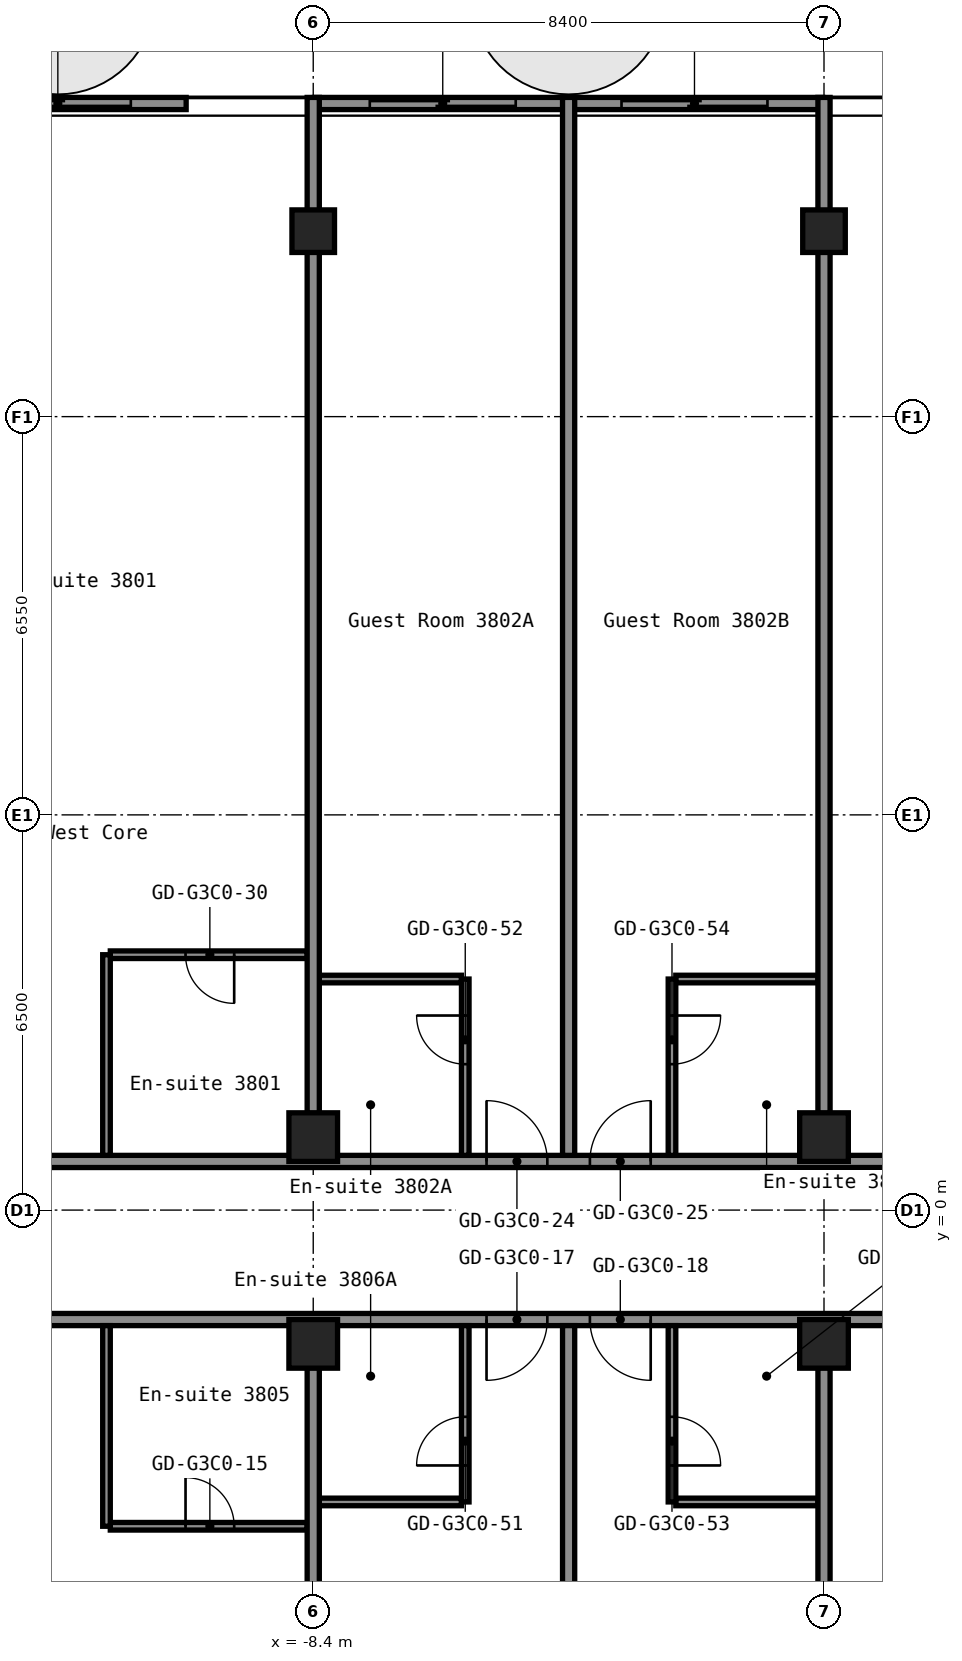
"""IFC4 building model, lengths in metres.
Left out: names, types, materials, properties, quantities, classifications, styles, units other than length and angle.
Written with IfcOpenShell. Run it as: python <this file> out.ifc"""

import sys

from ifc_helpers import new_model, si_unit, direction, frame, frame_2d, origin, origin_2d, place, context, subcontext, project, spatial, rectangle, hollow_rectangle, extrude, element, fill, save


model = new_model("IFC4")
c1 = context("Model", 3, precision=1e-05, world=origin(), true_north=direction((0.0, 1.0)))
c2 = subcontext(c1, "Body", "Model", "MODEL_VIEW")
j1 = project(units=[si_unit("LENGTHUNIT", "METRE"), si_unit("PLANEANGLEUNIT", "RADIAN")], contexts=[c1])
p1 = place(None, origin())
s1 = spatial("IfcSite", under=j1, at=p1, CompositionType="ELEMENT")
p2 = place(p1, origin())
s2 = spatial("IfcBuilding", under=s1, at=p2, CompositionType="ELEMENT")
p3 = place(p2, frame((0.0, 0.0, 137.4)))
s3 = spatial("IfcBuildingStorey", under=s2, at=p3, CompositionType="ELEMENT", Elevation=137.4)
for number, where, z_axis, x_axis in (
    (1, (-8.4, -2.2, 0.0), (0.0, 0.0, 1.0), (1.0, 0.0, 0.0)),
    (2, (-8.4, 1.2, 0.0), (0.0, 0.0, 1.0), (1.0, 0.0, 0.0)),
):
    element("IfcColumn", number, at=place(p3, frame(where, z_axis=z_axis, x_axis=x_axis)), inside=s3, PredefinedType="COLUMN", context=c2, shape_type="SweptSolid", body=[
        extrude(hollow_rectangle(XDim=0.8, YDim=0.8, WallThickness=0.032, at=origin_2d()), origin(), (0.0, 0.0, 1.0), 2.75),
    ])
p4 = place(p3, frame((-8.4, 16.1, 0.0), z_axis=(0.0, 0.0, 1.0), x_axis=(1.0, 0.0, 0.0)))
e3 = element("IfcColumn", 3, at=p4, inside=s3, PredefinedType="COLUMN", context=c2, shape_type="SweptSolid", body=[
    extrude(hollow_rectangle(XDim=0.7, YDim=0.7, WallThickness=0.028, at=origin_2d()), origin(), (0.0, 0.0, 1.0), 2.75),
])
for number, where, z_axis, x_axis in (
    (4, (0.0, -2.2, 0.0), (0.0, 0.0, 1.0), (1.0, 0.0, 0.0)),
    (5, (0.0, 1.2, 0.0), (0.0, 0.0, 1.0), (1.0, 0.0, 0.0)),
):
    element("IfcColumn", number, at=place(p3, frame(where, z_axis=z_axis, x_axis=x_axis)), inside=s3, PredefinedType="COLUMN", context=c2, shape_type="SweptSolid", body=[
        extrude(hollow_rectangle(XDim=0.8, YDim=0.8, WallThickness=0.032, at=origin_2d()), origin(), (0.0, 0.0, 1.0), 2.75),
    ])
p5 = place(p3, frame((0.0, 16.1, 0.0), z_axis=(0.0, 0.0, 1.0), x_axis=(1.0, 0.0, 0.0)))
e6 = element("IfcColumn", 6, at=p5, inside=s3, PredefinedType="COLUMN", context=c2, shape_type="SweptSolid", body=[
    extrude(hollow_rectangle(XDim=0.7, YDim=0.7, WallThickness=0.028, at=origin_2d()), origin(), (0.0, 0.0, 1.0), 2.75),
])
p6 = place(p3, frame((-11.738, -5.2, 0.0), z_axis=(0.0, 0.0, 1.0), x_axis=(1.0, 0.0, 0.0)))
e7 = element("IfcWall", 7, at=p6, inside=s3, PredefinedType="PARTITIONING", context=c2, shape_type="SweptSolid", body=[
    extrude(rectangle(XDim=3.238, YDim=0.125, at=frame_2d((1.619, 0.0))), origin(), (0.0, 0.0, 1.0), 2.75),
])
p7 = place(p6, frame((1.238, 0.0, 0.0)))
e8 = element("IfcOpeningElement", 8, at=p7, cuts=e7, PredefinedType="OPENING", context=c2, shape_type="SweptSolid", body=[
    extrude(rectangle(XDim=0.8, YDim=2.1, at=frame_2d((0.4, 1.05))), frame((0.0, 0.073, 0.0), z_axis=(0.0, -1.0, 0.0), x_axis=(1.0, 0.0, 0.0)), (0.0, 0.0, 1.0), 0.145),
])
p8 = place(p3, frame((-8.3, -4.8, 0.0), z_axis=(0.0, 0.0, 1.0), x_axis=(1.0, 0.0, 0.0)))
e9 = element("IfcWall", 9, at=p8, inside=s3, PredefinedType="PARTITIONING", context=c2, shape_type="SweptSolid", body=[
    extrude(rectangle(XDim=2.338, YDim=0.125, at=frame_2d((1.169, 0.0))), origin(), (0.0, 0.0, 1.0), 2.75),
])
p9 = place(p3, frame((-2.438, -4.8, 0.0), z_axis=(0.0, 0.0, 1.0), x_axis=(1.0, 0.0, 0.0)))
e10 = element("IfcWall", 10, at=p9, inside=s3, PredefinedType="PARTITIONING", context=c2, shape_type="SweptSolid", body=[
    extrude(rectangle(XDim=2.337, YDim=0.125, at=frame_2d((1.169, 0.0))), origin(), (0.0, 0.0, 1.0), 2.75),
])
p10 = place(p3, frame((-16.8, -1.8, 0.0), z_axis=(0.0, 0.0, 1.0), x_axis=(1.0, 0.0, 0.0)))
e11 = element("IfcWall", 11, at=p10, inside=s3, PredefinedType="PARTITIONING", context=c2, shape_type="SweptSolid", body=[
    extrude(rectangle(XDim=33.6, YDim=0.2, at=frame_2d((16.8, 0.0))), origin(), (0.0, 0.0, 1.0), 2.75),
])
p11 = place(p10, frame((2.0, 0.0, 0.0)))
e12 = element("IfcOpeningElement", 12, at=p11, cuts=e11, PredefinedType="OPENING", context=c2, shape_type="SweptSolid", body=[
    extrude(rectangle(XDim=1.0, YDim=2.1, at=frame_2d((0.5, 1.05))), frame((0.0, 0.11, 0.0), z_axis=(0.0, -1.0, 0.0), x_axis=(1.0, 0.0, 0.0)), (0.0, 0.0, 1.0), 0.22),
])
p12 = place(p10, frame((11.25, 0.0, 0.0)))
e13 = element("IfcOpeningElement", 13, at=p12, cuts=e11, PredefinedType="OPENING", context=c2, shape_type="SweptSolid", body=[
    extrude(rectangle(XDim=1.0, YDim=2.1, at=frame_2d((0.5, 1.05))), frame((0.0, 0.11, 0.0), z_axis=(0.0, -1.0, 0.0), x_axis=(1.0, 0.0, 0.0)), (0.0, 0.0, 1.0), 0.22),
])
p13 = place(p10, frame((12.95, 0.0, 0.0)))
e14 = element("IfcOpeningElement", 14, at=p13, cuts=e11, PredefinedType="OPENING", context=c2, shape_type="SweptSolid", body=[
    extrude(rectangle(XDim=1.0, YDim=2.1, at=frame_2d((0.5, 1.05))), frame((0.0, 0.11, 0.0), z_axis=(0.0, -1.0, 0.0), x_axis=(1.0, 0.0, 0.0)), (0.0, 0.0, 1.0), 0.22),
])
p14 = place(p10, frame((17.86, 0.0, 0.0)))
e15 = element("IfcOpeningElement", 15, at=p14, cuts=e11, PredefinedType="OPENING", context=c2, shape_type="SweptSolid", body=[
    extrude(rectangle(XDim=0.9, YDim=2.1, at=frame_2d((0.45, 1.05))), frame((0.0, 0.11, 0.0), z_axis=(0.0, -1.0, 0.0), x_axis=(1.0, 0.0, 0.0)), (0.0, 0.0, 1.0), 0.22),
])
p15 = place(p10, frame((22.06, 0.0, 0.0)))
e16 = element("IfcOpeningElement", 16, at=p15, cuts=e11, PredefinedType="OPENING", context=c2, shape_type="SweptSolid", body=[
    extrude(rectangle(XDim=0.9, YDim=2.1, at=frame_2d((0.45, 1.05))), frame((0.0, 0.11, 0.0), z_axis=(0.0, -1.0, 0.0), x_axis=(1.0, 0.0, 0.0)), (0.0, 0.0, 1.0), 0.22),
])
p16 = place(p10, frame((28.05, 0.0, 0.0)))
e17 = element("IfcOpeningElement", 17, at=p16, cuts=e11, PredefinedType="OPENING", context=c2, shape_type="SweptSolid", body=[
    extrude(rectangle(XDim=1.0, YDim=2.1, at=frame_2d((0.5, 1.05))), frame((0.0, 0.11, 0.0), z_axis=(0.0, -1.0, 0.0), x_axis=(1.0, 0.0, 0.0)), (0.0, 0.0, 1.0), 0.22),
])
p17 = place(p10, frame((29.75, 0.0, 0.0)))
e18 = element("IfcOpeningElement", 18, at=p17, cuts=e11, PredefinedType="OPENING", context=c2, shape_type="SweptSolid", body=[
    extrude(rectangle(XDim=1.0, YDim=2.1, at=frame_2d((0.5, 1.05))), frame((0.0, 0.11, 0.0), z_axis=(0.0, -1.0, 0.0), x_axis=(1.0, 0.0, 0.0)), (0.0, 0.0, 1.0), 0.22),
])
p18 = place(p3, frame((-16.8, 0.8, 0.0), z_axis=(0.0, 0.0, 1.0), x_axis=(1.0, 0.0, 0.0)))
e19 = element("IfcWall", 19, at=p18, inside=s3, PredefinedType="PARTITIONING", context=c2, shape_type="SweptSolid", body=[
    extrude(rectangle(XDim=33.6, YDim=0.2, at=frame_2d((16.8, 0.0))), origin(), (0.0, 0.0, 1.0), 2.75),
])
p19 = place(p18, frame((2.0, 0.0, 0.0)))
e20 = element("IfcOpeningElement", 20, at=p19, cuts=e19, PredefinedType="OPENING", context=c2, shape_type="SweptSolid", body=[
    extrude(rectangle(XDim=1.0, YDim=2.1, at=frame_2d((0.5, 1.05))), frame((0.0, 0.11, 0.0), z_axis=(0.0, -1.0, 0.0), x_axis=(1.0, 0.0, 0.0)), (0.0, 0.0, 1.0), 0.22),
])
p20 = place(p18, frame((11.25, 0.0, 0.0)))
e21 = element("IfcOpeningElement", 21, at=p20, cuts=e19, PredefinedType="OPENING", context=c2, shape_type="SweptSolid", body=[
    extrude(rectangle(XDim=1.0, YDim=2.1, at=frame_2d((0.5, 1.05))), frame((0.0, 0.11, 0.0), z_axis=(0.0, -1.0, 0.0), x_axis=(1.0, 0.0, 0.0)), (0.0, 0.0, 1.0), 0.22),
])
p21 = place(p18, frame((12.95, 0.0, 0.0)))
e22 = element("IfcOpeningElement", 22, at=p21, cuts=e19, PredefinedType="OPENING", context=c2, shape_type="SweptSolid", body=[
    extrude(rectangle(XDim=1.0, YDim=2.1, at=frame_2d((0.5, 1.05))), frame((0.0, 0.11, 0.0), z_axis=(0.0, -1.0, 0.0), x_axis=(1.0, 0.0, 0.0)), (0.0, 0.0, 1.0), 0.22),
])
p22 = place(p18, frame((18.7, 0.0, 0.0)))
e23 = element("IfcOpeningElement", 23, at=p22, cuts=e19, PredefinedType="OPENING", context=c2, shape_type="SweptSolid", body=[
    extrude(rectangle(XDim=0.9, YDim=2.1, at=frame_2d((0.45, 1.05))), frame((0.0, 0.11, 0.0), z_axis=(0.0, -1.0, 0.0), x_axis=(1.0, 0.0, 0.0)), (0.0, 0.0, 1.0), 0.22),
])
p23 = place(p18, frame((22.9, 0.0, 0.0)))
e24 = element("IfcOpeningElement", 24, at=p23, cuts=e19, PredefinedType="OPENING", context=c2, shape_type="SweptSolid", body=[
    extrude(rectangle(XDim=0.9, YDim=2.1, at=frame_2d((0.45, 1.05))), frame((0.0, 0.11, 0.0), z_axis=(0.0, -1.0, 0.0), x_axis=(1.0, 0.0, 0.0)), (0.0, 0.0, 1.0), 0.22),
])
p24 = place(p18, frame((28.05, 0.0, 0.0)))
e25 = element("IfcOpeningElement", 25, at=p24, cuts=e19, PredefinedType="OPENING", context=c2, shape_type="SweptSolid", body=[
    extrude(rectangle(XDim=1.0, YDim=2.1, at=frame_2d((0.5, 1.05))), frame((0.0, 0.11, 0.0), z_axis=(0.0, -1.0, 0.0), x_axis=(1.0, 0.0, 0.0)), (0.0, 0.0, 1.0), 0.22),
])
p25 = place(p18, frame((29.75, 0.0, 0.0)))
e26 = element("IfcOpeningElement", 26, at=p25, cuts=e19, PredefinedType="OPENING", context=c2, shape_type="SweptSolid", body=[
    extrude(rectangle(XDim=1.0, YDim=2.1, at=frame_2d((0.5, 1.05))), frame((0.0, 0.11, 0.0), z_axis=(0.0, -1.0, 0.0), x_axis=(1.0, 0.0, 0.0)), (0.0, 0.0, 1.0), 0.22),
])
p26 = place(p3, frame((-8.3, 3.8, 0.0), z_axis=(0.0, 0.0, 1.0), x_axis=(1.0, 0.0, 0.0)))
e27 = element("IfcWall", 27, at=p26, inside=s3, PredefinedType="PARTITIONING", context=c2, shape_type="SweptSolid", body=[
    extrude(rectangle(XDim=2.338, YDim=0.125, at=frame_2d((1.169, 0.0))), origin(), (0.0, 0.0, 1.0), 2.75),
])
p27 = place(p3, frame((-2.438, 3.8, 0.0), z_axis=(0.0, 0.0, 1.0), x_axis=(1.0, 0.0, 0.0)))
e28 = element("IfcWall", 28, at=p27, inside=s3, PredefinedType="PARTITIONING", context=c2, shape_type="SweptSolid", body=[
    extrude(rectangle(XDim=2.337, YDim=0.125, at=frame_2d((1.169, 0.0))), origin(), (0.0, 0.0, 1.0), 2.75),
])
p28 = place(p3, frame((-11.738, 4.2, 0.0), z_axis=(0.0, 0.0, 1.0), x_axis=(1.0, 0.0, 0.0)))
e29 = element("IfcWall", 29, at=p28, inside=s3, PredefinedType="PARTITIONING", context=c2, shape_type="SweptSolid", body=[
    extrude(rectangle(XDim=3.238, YDim=0.125, at=frame_2d((1.619, 0.0))), origin(), (0.0, 0.0, 1.0), 2.75),
])
p29 = place(p28, frame((1.238, 0.0, 0.0)))
e30 = element("IfcOpeningElement", 30, at=p29, cuts=e29, PredefinedType="OPENING", context=c2, shape_type="SweptSolid", body=[
    extrude(rectangle(XDim=0.8, YDim=2.1, at=frame_2d((0.4, 1.05))), frame((0.0, 0.073, 0.0), z_axis=(0.0, -1.0, 0.0), x_axis=(1.0, 0.0, 0.0)), (0.0, 0.0, 1.0), 0.145),
])
for number, where, z_axis, x_axis in (
    (31, (-11.8, -5.2, 0.0), (0.0, 0.0, 1.0), (0.0, 1.0, 0.0)),
    (32, (-11.8, 0.9, 0.0), (0.0, 0.0, 1.0), (0.0, 1.0, 0.0)),
):
    element("IfcWall", number, at=place(p3, frame(where, z_axis=z_axis, x_axis=x_axis)), inside=s3, PredefinedType="PARTITIONING", context=c2, shape_type="SweptSolid", body=[
        extrude(rectangle(XDim=3.3, YDim=0.125, at=frame_2d((1.65, 0.0))), origin(), (0.0, 0.0, 1.0), 2.75),
    ])
for number, where, z_axis, x_axis in (
    (33, (-8.4, -19.3, 0.0), (0.0, 0.0, 1.0), (0.0, 1.0, 0.0)),
    (34, (-8.4, 1.59, 0.0), (0.0, 0.0, 1.0), (0.0, 1.0, 0.0)),
):
    element("IfcWall", number, at=place(p3, frame(where, z_axis=z_axis, x_axis=x_axis)), inside=s3, PredefinedType="PARTITIONING", context=c2, shape_type="SweptSolid", body=[
        extrude(rectangle(XDim=16.71, YDim=0.2, at=frame_2d((8.355, 0.0))), origin(), (0.0, 0.0, 1.0), 2.75),
    ])
p30 = place(p3, frame((-5.9, -4.8, 0.0), z_axis=(0.0, 0.0, 1.0), x_axis=(0.0, 1.0, 0.0)))
e35 = element("IfcWall", 35, at=p30, inside=s3, PredefinedType="PARTITIONING", context=c2, shape_type="SweptSolid", body=[
    extrude(rectangle(XDim=2.9, YDim=0.125, at=frame_2d((1.45, 0.0))), origin(), (0.0, 0.0, 1.0), 2.75),
])
p31 = place(p30, frame((0.6, 0.0, 0.0)))
e36 = element("IfcOpeningElement", 36, at=p31, cuts=e35, PredefinedType="OPENING", context=c2, shape_type="SweptSolid", body=[
    extrude(rectangle(XDim=0.8, YDim=2.1, at=frame_2d((0.4, 1.05))), frame((0.0, 0.073, 0.0), z_axis=(0.0, -1.0, 0.0), x_axis=(1.0, 0.0, 0.0)), (0.0, 0.0, 1.0), 0.145),
])
p32 = place(p3, frame((-5.9, 0.9, 0.0), z_axis=(0.0, 0.0, 1.0), x_axis=(0.0, 1.0, 0.0)))
e37 = element("IfcWall", 37, at=p32, inside=s3, PredefinedType="PARTITIONING", context=c2, shape_type="SweptSolid", body=[
    extrude(rectangle(XDim=2.9, YDim=0.125, at=frame_2d((1.45, 0.0))), origin(), (0.0, 0.0, 1.0), 2.75),
])
p33 = place(p32, frame((1.5, 0.0, 0.0)))
e38 = element("IfcOpeningElement", 38, at=p33, cuts=e37, PredefinedType="OPENING", context=c2, shape_type="SweptSolid", body=[
    extrude(rectangle(XDim=0.8, YDim=2.1, at=frame_2d((0.4, 1.05))), frame((0.0, 0.073, 0.0), z_axis=(0.0, -1.0, 0.0), x_axis=(1.0, 0.0, 0.0)), (0.0, 0.0, 1.0), 0.145),
])
for number, where, z_axis, x_axis in (
    (39, (-4.2, -19.3, 0.0), (0.0, 0.0, 1.0), (0.0, 1.0, 0.0)),
    (40, (-4.2, 0.9, 0.0), (0.0, 0.0, 1.0), (0.0, 1.0, 0.0)),
):
    element("IfcWall", number, at=place(p3, frame(where, z_axis=z_axis, x_axis=x_axis)), inside=s3, PredefinedType="PARTITIONING", context=c2, shape_type="SweptSolid", body=[
        extrude(rectangle(XDim=17.4, YDim=0.2, at=frame_2d((8.7, 0.0))), origin(), (0.0, 0.0, 1.0), 2.75),
    ])
p34 = place(p3, frame((-2.5, -4.8, 0.0), z_axis=(0.0, 0.0, 1.0), x_axis=(0.0, 1.0, 0.0)))
e41 = element("IfcWall", 41, at=p34, inside=s3, PredefinedType="PARTITIONING", context=c2, shape_type="SweptSolid", body=[
    extrude(rectangle(XDim=2.9, YDim=0.125, at=frame_2d((1.45, 0.0))), origin(), (0.0, 0.0, 1.0), 2.75),
])
p35 = place(p34, frame((0.6, 0.0, 0.0)))
e42 = element("IfcOpeningElement", 42, at=p35, cuts=e41, PredefinedType="OPENING", context=c2, shape_type="SweptSolid", body=[
    extrude(rectangle(XDim=0.8, YDim=2.1, at=frame_2d((0.4, 1.05))), frame((0.0, 0.073, 0.0), z_axis=(0.0, -1.0, 0.0), x_axis=(1.0, 0.0, 0.0)), (0.0, 0.0, 1.0), 0.145),
])
p36 = place(p3, frame((-2.5, 0.9, 0.0), z_axis=(0.0, 0.0, 1.0), x_axis=(0.0, 1.0, 0.0)))
e43 = element("IfcWall", 43, at=p36, inside=s3, PredefinedType="PARTITIONING", context=c2, shape_type="SweptSolid", body=[
    extrude(rectangle(XDim=2.9, YDim=0.125, at=frame_2d((1.45, 0.0))), origin(), (0.0, 0.0, 1.0), 2.75),
])
p37 = place(p36, frame((1.5, 0.0, 0.0)))
e44 = element("IfcOpeningElement", 44, at=p37, cuts=e43, PredefinedType="OPENING", context=c2, shape_type="SweptSolid", body=[
    extrude(rectangle(XDim=0.8, YDim=2.1, at=frame_2d((0.4, 1.05))), frame((0.0, 0.073, 0.0), z_axis=(0.0, -1.0, 0.0), x_axis=(1.0, 0.0, 0.0)), (0.0, 0.0, 1.0), 0.145),
])
for number, where, z_axis, x_axis in (
    (45, (0.0, -19.3, 0.0), (0.0, 0.0, 1.0), (0.0, 1.0, 0.0)),
    (46, (0.0, 1.59, 0.0), (0.0, 0.0, 1.0), (0.0, 1.0, 0.0)),
):
    element("IfcWall", number, at=place(p3, frame(where, z_axis=z_axis, x_axis=x_axis)), inside=s3, PredefinedType="PARTITIONING", context=c2, shape_type="SweptSolid", body=[
        extrude(rectangle(XDim=16.71, YDim=0.2, at=frame_2d((8.355, 0.0))), origin(), (0.0, 0.0, 1.0), 2.75),
    ])
p38 = place(p3, frame((-0.02, 18.2, 0.0), z_axis=(0.0, 0.0, 1.0), x_axis=(-1.0, 0.0, 0.0)))
p39 = place(p38, frame((0.91, 0.0, 0.0)))
p40 = place(p39, frame((2.4, 0.0, 0.0), z_axis=(0.0, 0.0, 1.0), x_axis=(-1.0, 0.0, 0.0)))
e47 = element("IfcDoor", 47, at=p40, inside=s3, OperationType="SLIDING_TO_LEFT", PredefinedType="DOOR", context=c2, shape_type="SweptSolid", body=[
    extrude(rectangle(XDim=2.4, YDim=2.2, at=frame_2d((1.2, 1.1))), frame((0.0, 0.025, 0.0), z_axis=(0.0, -1.0, 0.0), x_axis=(1.0, 0.0, 0.0)), (0.0, 0.0, 1.0), 0.05),
])
p41 = place(p3, frame((-4.16, 18.2, 0.0), z_axis=(0.0, 0.0, 1.0), x_axis=(-1.0, 0.0, 0.0)))
p42 = place(p41, frame((0.91, 0.0, 0.0)))
p43 = place(p42, frame((2.4, 0.0, 0.0), z_axis=(0.0, 0.0, 1.0), x_axis=(-1.0, 0.0, 0.0)))
e48 = element("IfcDoor", 48, at=p43, inside=s3, OperationType="SLIDING_TO_LEFT", PredefinedType="DOOR", context=c2, shape_type="SweptSolid", body=[
    extrude(rectangle(XDim=2.4, YDim=2.2, at=frame_2d((1.2, 1.1))), frame((0.0, 0.025, 0.0), z_axis=(0.0, -1.0, 0.0), x_axis=(1.0, 0.0, 0.0)), (0.0, 0.0, 1.0), 0.05),
])
p44 = place(p3, frame((-10.49, 18.2, 0.0), z_axis=(0.0, 0.0, 1.0), x_axis=(-1.0, 0.0, 0.0)))
p45 = place(p44, frame((0.91, 0.0, 0.0)))
p46 = place(p45, frame((2.4, 0.0, 0.0), z_axis=(0.0, 0.0, 1.0), x_axis=(-1.0, 0.0, 0.0)))
e49 = element("IfcDoor", 49, at=p46, inside=s3, OperationType="SLIDING_TO_LEFT", PredefinedType="DOOR", context=c2, shape_type="SweptSolid", body=[
    extrude(rectangle(XDim=2.4, YDim=2.2, at=frame_2d((1.2, 1.1))), frame((0.0, 0.025, 0.0), z_axis=(0.0, -1.0, 0.0), x_axis=(1.0, 0.0, 0.0)), (0.0, 0.0, 1.0), 0.05),
])
p47 = place(p7, origin())
e50 = element("IfcDoor", 50, at=p47, inside=s3, OperationType="SINGLE_SWING_RIGHT", PredefinedType="DOOR", context=c2, shape_type="SweptSolid", body=[
    extrude(rectangle(XDim=0.8, YDim=2.1, at=frame_2d((0.4, 1.05))), frame((0.0, 0.025, 0.0), z_axis=(0.0, -1.0, 0.0), x_axis=(1.0, 0.0, 0.0)), (0.0, 0.0, 1.0), 0.05),
])
fill(e8, e50)
p48 = place(p12, origin())
e51 = element("IfcDoor", 51, at=p48, inside=s3, OperationType="SINGLE_SWING_LEFT", PredefinedType="DOOR", context=c2, shape_type="SweptSolid", body=[
    extrude(rectangle(XDim=1.0, YDim=2.1, at=frame_2d((0.5, 1.05))), frame((0.0, 0.025, 0.0), z_axis=(0.0, -1.0, 0.0), x_axis=(1.0, 0.0, 0.0)), (0.0, 0.0, 1.0), 0.05),
])
fill(e13, e51)
p49 = place(p13, origin())
e52 = element("IfcDoor", 52, at=p49, inside=s3, OperationType="SINGLE_SWING_RIGHT", PredefinedType="DOOR", context=c2, shape_type="SweptSolid", body=[
    extrude(rectangle(XDim=1.0, YDim=2.1, at=frame_2d((0.5, 1.05))), frame((0.0, 0.025, 0.0), z_axis=(0.0, -1.0, 0.0), x_axis=(1.0, 0.0, 0.0)), (0.0, 0.0, 1.0), 0.05),
])
fill(e14, e52)
p50 = place(p20, origin())
e53 = element("IfcDoor", 53, at=p50, inside=s3, OperationType="SINGLE_SWING_RIGHT", PredefinedType="DOOR", context=c2, shape_type="SweptSolid", body=[
    extrude(rectangle(XDim=1.0, YDim=2.1, at=frame_2d((0.5, 1.05))), frame((0.0, 0.025, 0.0), z_axis=(0.0, -1.0, 0.0), x_axis=(1.0, 0.0, 0.0)), (0.0, 0.0, 1.0), 0.05),
])
fill(e21, e53)
p51 = place(p21, origin())
e54 = element("IfcDoor", 54, at=p51, inside=s3, OperationType="SINGLE_SWING_LEFT", PredefinedType="DOOR", context=c2, shape_type="SweptSolid", body=[
    extrude(rectangle(XDim=1.0, YDim=2.1, at=frame_2d((0.5, 1.05))), frame((0.0, 0.025, 0.0), z_axis=(0.0, -1.0, 0.0), x_axis=(1.0, 0.0, 0.0)), (0.0, 0.0, 1.0), 0.05),
])
fill(e22, e54)
p52 = place(p29, origin())
e55 = element("IfcDoor", 55, at=p52, inside=s3, OperationType="SINGLE_SWING_RIGHT", PredefinedType="DOOR", context=c2, shape_type="SweptSolid", body=[
    extrude(rectangle(XDim=0.8, YDim=2.1, at=frame_2d((0.4, 1.05))), frame((0.0, 0.025, 0.0), z_axis=(0.0, -1.0, 0.0), x_axis=(1.0, 0.0, 0.0)), (0.0, 0.0, 1.0), 0.05),
])
fill(e30, e55)
p53 = place(p31, origin())
e56 = element("IfcDoor", 56, at=p53, inside=s3, OperationType="SINGLE_SWING_RIGHT", PredefinedType="DOOR", context=c2, shape_type="SweptSolid", body=[
    extrude(rectangle(XDim=0.8, YDim=2.1, at=frame_2d((0.4, 1.05))), frame((0.0, 0.025, 0.0), z_axis=(0.0, -1.0, 0.0), x_axis=(1.0, 0.0, 0.0)), (0.0, 0.0, 1.0), 0.05),
])
fill(e36, e56)
p54 = place(p33, origin())
e57 = element("IfcDoor", 57, at=p54, inside=s3, OperationType="SINGLE_SWING_LEFT", PredefinedType="DOOR", context=c2, shape_type="SweptSolid", body=[
    extrude(rectangle(XDim=0.8, YDim=2.1, at=frame_2d((0.4, 1.05))), frame((0.0, 0.025, 0.0), z_axis=(0.0, -1.0, 0.0), x_axis=(1.0, 0.0, 0.0)), (0.0, 0.0, 1.0), 0.05),
])
fill(e38, e57)
p55 = place(p35, origin())
e58 = element("IfcDoor", 58, at=p55, inside=s3, OperationType="SINGLE_SWING_LEFT", PredefinedType="DOOR", context=c2, shape_type="SweptSolid", body=[
    extrude(rectangle(XDim=0.8, YDim=2.1, at=frame_2d((0.4, 1.05))), frame((0.0, 0.025, 0.0), z_axis=(0.0, -1.0, 0.0), x_axis=(1.0, 0.0, 0.0)), (0.0, 0.0, 1.0), 0.05),
])
fill(e42, e58)
p56 = place(p37, origin())
e59 = element("IfcDoor", 59, at=p56, inside=s3, OperationType="SINGLE_SWING_RIGHT", PredefinedType="DOOR", context=c2, shape_type="SweptSolid", body=[
    extrude(rectangle(XDim=0.8, YDim=2.1, at=frame_2d((0.4, 1.05))), frame((0.0, 0.025, 0.0), z_axis=(0.0, -1.0, 0.0), x_axis=(1.0, 0.0, 0.0)), (0.0, 0.0, 1.0), 0.05),
])
fill(e44, e59)
save(model, sys.argv[1])
